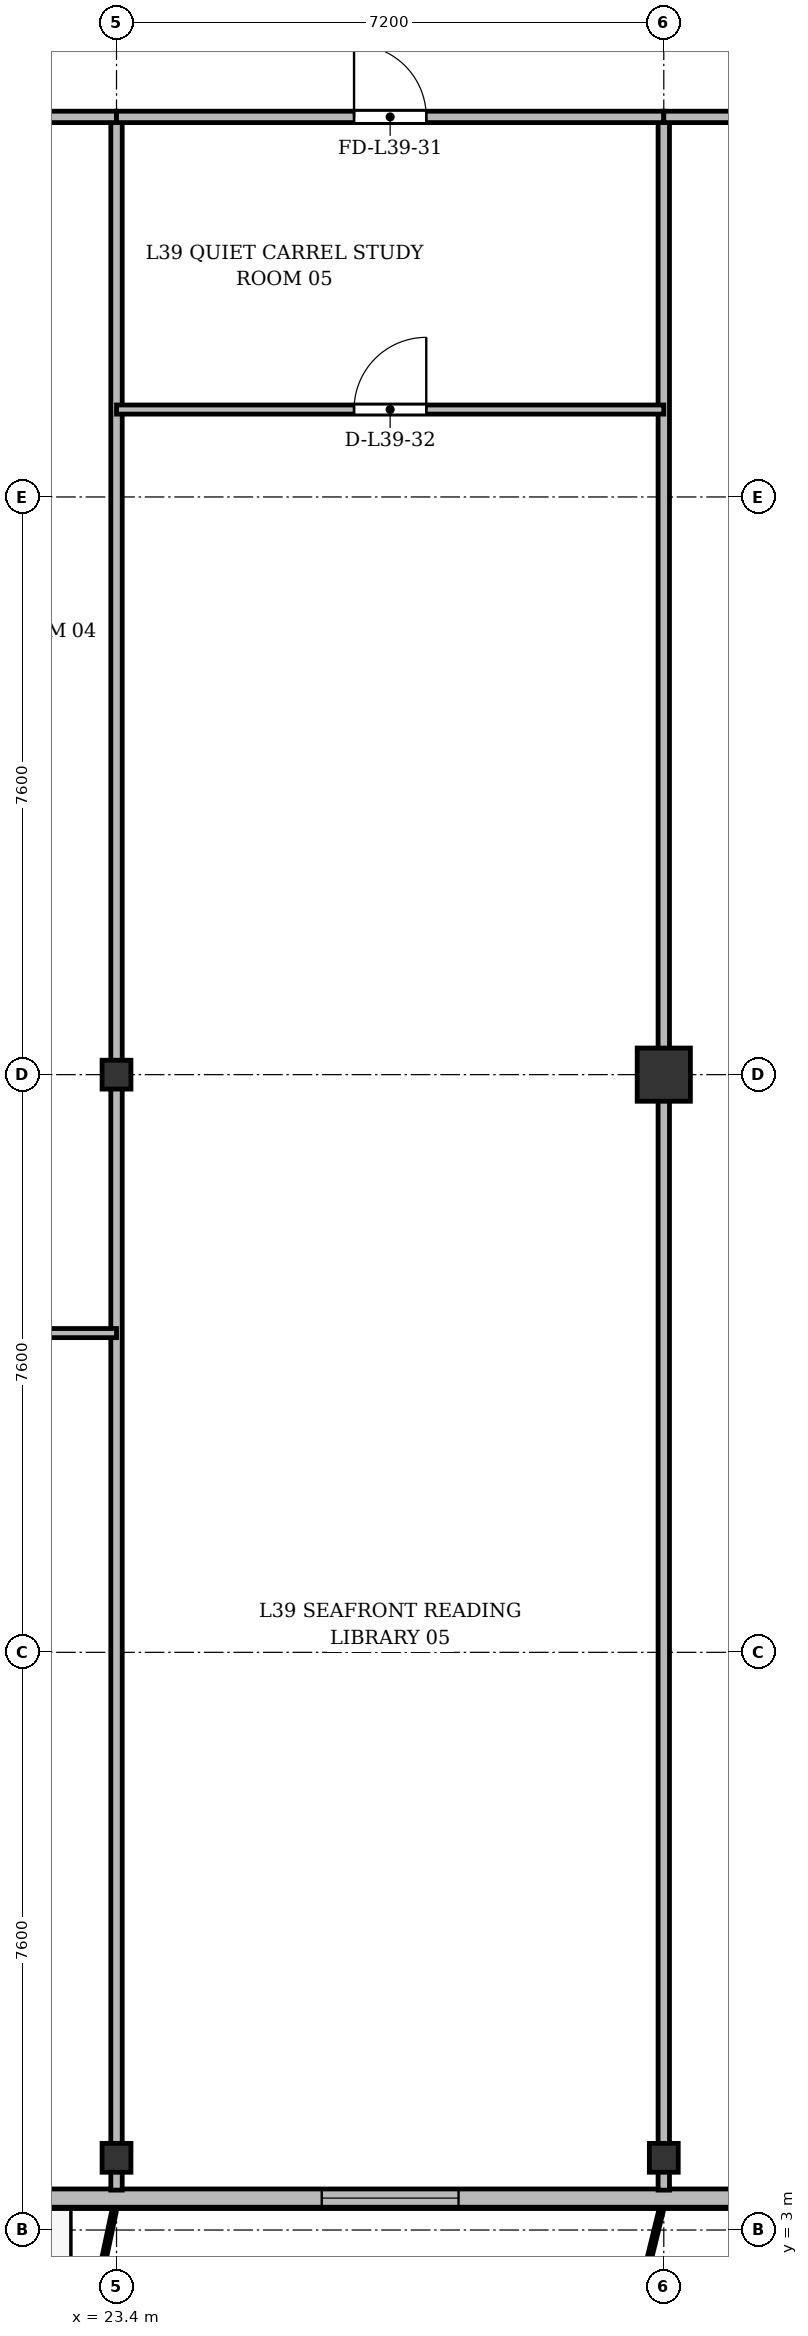
"""IFC4 building model, lengths in metres.
Left out: names, types, materials, properties, quantities, classifications, styles, units other than length and angle.
Written with IfcOpenShell. Run it as: python <this file> out.ifc"""

import sys

from ifc_helpers import new_model, si_unit, direction, frame, frame_2d, origin, origin_2d, place, context, subcontext, project, spatial, rectangle, i_section, extrude, source, transform, mapped, element, fill, save


model = new_model("IFC4")
c1 = context("Model", 3, precision=1e-05, world=origin(), true_north=direction((0.0, 1.0)))
c2 = subcontext(c1, "Body", "Model", "MODEL_VIEW")
j1 = project(units=[si_unit("LENGTHUNIT", "METRE"), si_unit("PLANEANGLEUNIT", "RADIAN")], contexts=[c1])
p1 = place(None, origin())
s1 = spatial("IfcSite", under=j1, at=p1, CompositionType="ELEMENT")
p2 = place(p1, origin())
s2 = spatial("IfcBuilding", under=s1, at=p2, CompositionType="ELEMENT")
p3 = place(p2, frame((0.0, 0.0, 150.1)))
s3 = spatial("IfcBuildingStorey", under=s2, at=p3, CompositionType="ELEMENT", Elevation=150.1)
m1 = source(origin(), c2, "Body", "SweptSolid", [
    extrude(i_section(OverallWidth=0.38, OverallDepth=0.38, WebThickness=0.02, FlangeThickness=0.03, at=origin_2d()), origin(), (0.0, 0.0, 1.0), 3.6),
])
for number, where, z_axis, x_axis in (
    (1, (23.4, 3.95, 0.0), (0.0, 0.0, 1.0), (1.0, 0.0, 0.0)),
    (2, (23.4, 18.2, 0.0), (0.0, 0.0, 1.0), (1.0, 0.0, 0.0)),
    (3, (30.6, 3.95, 0.0), (0.0, 0.0, 1.0), (1.0, 0.0, 0.0)),
):
    element("IfcColumn", number, at=place(p3, frame(where, z_axis=z_axis, x_axis=x_axis)), inside=s3, PredefinedType="COLUMN", context=c2, shape_type="MappedRepresentation", body=[
        mapped(m1, transform((0.0, 0.0, 0.0), x_axis=(1.0, 0.0, 0.0), y_axis=(0.0, 1.0, 0.0), z_axis=(0.0, 0.0, 1.0), scale=1.0)),
    ])
m2 = source(origin(), c2, "Body", "SweptSolid", [
    extrude(rectangle(XDim=0.7, YDim=0.7, at=origin_2d()), origin(), (0.0, 0.0, 1.0), 3.6),
])
p4 = place(p3, frame((30.6, 18.2, 0.0), z_axis=(0.0, 0.0, 1.0), x_axis=(1.0, 0.0, 0.0)))
e4 = element("IfcColumn", 4, at=p4, inside=s3, PredefinedType="COLUMN", context=c2, shape_type="MappedRepresentation", body=[
    mapped(m2, transform((0.0, 0.0, 0.0), x_axis=(1.0, 0.0, 0.0), y_axis=(0.0, 1.0, 0.0), z_axis=(0.0, 0.0, 1.0), scale=1.0)),
])
p5 = place(p3, frame((63.6, 3.42, 0.0), z_axis=(0.0, 0.0, 1.0), x_axis=(-1.0, 0.0, 0.0)))
e5 = element("IfcWall", 5, at=p5, inside=s3, PredefinedType="SOLIDWALL", context=c2, shape_type="SweptSolid", body=[
    extrude(rectangle(XDim=52.8, YDim=0.24, at=frame_2d((26.4, 0.0))), origin(), (0.0, 0.0, 1.0), 3.35),
])
p6 = place(p5, frame((1.62, 0.0, 0.9)))
e6 = element("IfcOpeningElement", 6, at=p6, cuts=e5, PredefinedType="OPENING", context=c2, shape_type="SweptSolid", body=[
    extrude(rectangle(XDim=1.65, YDim=1.85, at=frame_2d((0.825, 0.925))), frame((0.0, 0.13, 0.0), z_axis=(0.0, -1.0, 0.0), x_axis=(1.0, 0.0, 0.0)), (0.0, 0.0, 1.0), 0.26),
])
p7 = place(p5, frame((5.2, 0.0, 0.9)))
e7 = element("IfcOpeningElement", 7, at=p7, cuts=e5, PredefinedType="OPENING", context=c2, shape_type="SweptSolid", body=[
    extrude(rectangle(XDim=1.8, YDim=1.8, at=frame_2d((0.9, 0.9))), frame((0.0, 0.13, 0.0), z_axis=(0.0, -1.0, 0.0), x_axis=(1.0, 0.0, 0.0)), (0.0, 0.0, 1.0), 0.26),
])
p8 = place(p5, frame((7.65, 0.0, 0.9)))
e8 = element("IfcOpeningElement", 8, at=p8, cuts=e5, PredefinedType="OPENING", context=c2, shape_type="SweptSolid", body=[
    extrude(rectangle(XDim=1.5, YDim=1.75, at=frame_2d((0.75, 0.875))), frame((0.0, 0.13, 0.0), z_axis=(0.0, -1.0, 0.0), x_axis=(1.0, 0.0, 0.0)), (0.0, 0.0, 1.0), 0.26),
])
p9 = place(p5, frame((10.25, 0.0, 0.9)))
e9 = element("IfcOpeningElement", 9, at=p9, cuts=e5, PredefinedType="OPENING", context=c2, shape_type="SweptSolid", body=[
    extrude(rectangle(XDim=1.5, YDim=1.75, at=frame_2d((0.75, 0.875))), frame((0.0, 0.13, 0.0), z_axis=(0.0, -1.0, 0.0), x_axis=(1.0, 0.0, 0.0)), (0.0, 0.0, 1.0), 0.26),
])
p10 = place(p5, frame((14.417, 0.0, 0.0)))
e10 = element("IfcOpeningElement", 10, at=p10, cuts=e5, PredefinedType="OPENING", context=c2, shape_type="SweptSolid", body=[
    extrude(rectangle(XDim=1.2, YDim=2.2, at=frame_2d((0.6, 1.1))), frame((0.0, 0.13, 0.0), z_axis=(0.0, -1.0, 0.0), x_axis=(1.0, 0.0, 0.0)), (0.0, 0.0, 1.0), 0.26),
])
p11 = place(p5, frame((25.575, 0.0, 0.9)))
e11 = element("IfcOpeningElement", 11, at=p11, cuts=e5, PredefinedType="OPENING", context=c2, shape_type="SweptSolid", body=[
    extrude(rectangle(XDim=1.65, YDim=1.85, at=frame_2d((0.825, 0.925))), frame((0.0, 0.13, 0.0), z_axis=(0.0, -1.0, 0.0), x_axis=(1.0, 0.0, 0.0)), (0.0, 0.0, 1.0), 0.26),
])
p12 = place(p5, frame((35.7, 0.0, 0.9)))
e12 = element("IfcOpeningElement", 12, at=p12, cuts=e5, PredefinedType="OPENING", context=c2, shape_type="SweptSolid", body=[
    extrude(rectangle(XDim=1.8, YDim=1.8, at=frame_2d((0.9, 0.9))), frame((0.0, 0.13, 0.0), z_axis=(0.0, -1.0, 0.0), x_axis=(1.0, 0.0, 0.0)), (0.0, 0.0, 1.0), 0.26),
])
p13 = place(p5, frame((41.656, 0.0, 0.0)))
e13 = element("IfcOpeningElement", 13, at=p13, cuts=e5, PredefinedType="OPENING", context=c2, shape_type="SweptSolid", body=[
    extrude(rectangle(XDim=1.2, YDim=2.2, at=frame_2d((0.6, 1.1))), frame((0.0, 0.13, 0.0), z_axis=(0.0, -1.0, 0.0), x_axis=(1.0, 0.0, 0.0)), (0.0, 0.0, 1.0), 0.26),
])
p14 = place(p5, frame((43.65, 0.0, 0.9)))
e14 = element("IfcOpeningElement", 14, at=p14, cuts=e5, PredefinedType="OPENING", context=c2, shape_type="SweptSolid", body=[
    extrude(rectangle(XDim=1.5, YDim=1.75, at=frame_2d((0.75, 0.875))), frame((0.0, 0.13, 0.0), z_axis=(0.0, -1.0, 0.0), x_axis=(1.0, 0.0, 0.0)), (0.0, 0.0, 1.0), 0.26),
])
p15 = place(p5, frame((45.7, 0.0, 0.9)))
e15 = element("IfcOpeningElement", 15, at=p15, cuts=e5, PredefinedType="OPENING", context=c2, shape_type="SweptSolid", body=[
    extrude(rectangle(XDim=2.0, YDim=1.95, at=frame_2d((1.0, 0.975))), frame((0.0, 0.13, 0.0), z_axis=(0.0, -1.0, 0.0), x_axis=(1.0, 0.0, 0.0)), (0.0, 0.0, 1.0), 0.26),
])
p16 = place(p5, frame((49.53, 0.0, 0.9)))
e16 = element("IfcOpeningElement", 16, at=p16, cuts=e5, PredefinedType="OPENING", context=c2, shape_type="SweptSolid", body=[
    extrude(rectangle(XDim=1.65, YDim=1.85, at=frame_2d((0.825, 0.925))), frame((0.0, 0.13, 0.0), z_axis=(0.0, -1.0, 0.0), x_axis=(1.0, 0.0, 0.0)), (0.0, 0.0, 1.0), 0.26),
])
for number, where, z_axis, x_axis in (
    (17, (23.4, 3.525, 0.0), (0.0, 0.0, 1.0), (0.0, 1.0, 0.0)),
    (18, (30.6, 3.525, 0.0), (0.0, 0.0, 1.0), (0.0, 1.0, 0.0)),
):
    element("IfcWall", number, at=place(p3, frame(where, z_axis=z_axis, x_axis=x_axis)), inside=s3, PredefinedType="PARTITIONING", context=c2, shape_type="SweptSolid", body=[
        extrude(rectangle(XDim=27.275, YDim=0.15, at=frame_2d((13.638, 0.0))), origin(), (0.0, 0.0, 1.0), 2.85),
    ])
p17 = place(p3, frame((20.2, 30.8, 0.0), z_axis=(0.0, 0.0, 1.0), x_axis=(1.0, 0.0, 0.0)))
e19 = element("IfcWall", 19, at=p17, inside=s3, PredefinedType="PARTITIONING", context=c2, shape_type="SweptSolid", body=[
    extrude(rectangle(XDim=3.2, YDim=0.15, at=frame_2d((1.6, 0.0))), origin(), (0.0, 0.0, 1.0), 2.85),
])
p18 = place(p17, frame((1.125, 0.0, 0.0)))
e20 = element("IfcOpeningElement", 20, at=p18, cuts=e19, PredefinedType="OPENING", context=c2, shape_type="SweptSolid", body=[
    extrude(rectangle(XDim=0.95, YDim=2.15, at=frame_2d((0.475, 1.075))), frame((0.0, 0.085, 0.0), z_axis=(0.0, -1.0, 0.0), x_axis=(1.0, 0.0, 0.0)), (0.0, 0.0, 1.0), 0.17),
])
p19 = place(p3, frame((20.2, 14.8, 0.0), z_axis=(0.0, 0.0, 1.0), x_axis=(1.0, 0.0, 0.0)))
e21 = element("IfcWall", 21, at=p19, inside=s3, PredefinedType="PARTITIONING", context=c2, shape_type="SweptSolid", body=[
    extrude(rectangle(XDim=3.2, YDim=0.12, at=frame_2d((1.6, 0.0))), origin(), (0.0, 0.0, 1.0), 2.85),
])
p20 = place(p19, frame((1.125, 0.0, 0.0)))
e22 = element("IfcOpeningElement", 22, at=p20, cuts=e21, PredefinedType="OPENING", context=c2, shape_type="SweptSolid", body=[
    extrude(rectangle(XDim=0.95, YDim=2.15, at=frame_2d((0.475, 1.075))), frame((0.0, 0.07, 0.0), z_axis=(0.0, -1.0, 0.0), x_axis=(1.0, 0.0, 0.0)), (0.0, 0.0, 1.0), 0.14),
])
p21 = place(p3, frame((23.4, 30.8, 0.0), z_axis=(0.0, 0.0, 1.0), x_axis=(1.0, 0.0, 0.0)))
e23 = element("IfcWall", 23, at=p21, inside=s3, PredefinedType="PARTITIONING", context=c2, shape_type="SweptSolid", body=[
    extrude(rectangle(XDim=7.2, YDim=0.15, at=frame_2d((3.6, 0.0))), origin(), (0.0, 0.0, 1.0), 2.85),
])
p22 = place(p21, frame((3.125, 0.0, 0.0)))
e24 = element("IfcOpeningElement", 24, at=p22, cuts=e23, PredefinedType="OPENING", context=c2, shape_type="SweptSolid", body=[
    extrude(rectangle(XDim=0.95, YDim=2.15, at=frame_2d((0.475, 1.075))), frame((0.0, 0.085, 0.0), z_axis=(0.0, -1.0, 0.0), x_axis=(1.0, 0.0, 0.0)), (0.0, 0.0, 1.0), 0.17),
])
p23 = place(p3, frame((23.4, 26.95, 0.0), z_axis=(0.0, 0.0, 1.0), x_axis=(1.0, 0.0, 0.0)))
e25 = element("IfcWall", 25, at=p23, inside=s3, PredefinedType="PARTITIONING", context=c2, shape_type="SweptSolid", body=[
    extrude(rectangle(XDim=7.2, YDim=0.12, at=frame_2d((3.6, 0.0))), origin(), (0.0, 0.0, 1.0), 2.85),
])
p24 = place(p23, frame((3.125, 0.0, 0.0)))
e26 = element("IfcOpeningElement", 26, at=p24, cuts=e25, PredefinedType="OPENING", context=c2, shape_type="SweptSolid", body=[
    extrude(rectangle(XDim=0.95, YDim=2.15, at=frame_2d((0.475, 1.075))), frame((0.0, 0.07, 0.0), z_axis=(0.0, -1.0, 0.0), x_axis=(1.0, 0.0, 0.0)), (0.0, 0.0, 1.0), 0.14),
])
p25 = place(p3, frame((30.6, 30.8, 0.0), z_axis=(0.0, 0.0, 1.0), x_axis=(1.0, 0.0, 0.0)))
e27 = element("IfcWall", 27, at=p25, inside=s3, PredefinedType="PARTITIONING", context=c2, shape_type="SweptSolid", body=[
    extrude(rectangle(XDim=13.2, YDim=0.15, at=frame_2d((6.6, 0.0))), origin(), (0.0, 0.0, 1.0), 2.85),
])
p26 = place(p25, frame((5.8, 0.0, 0.0)))
e28 = element("IfcOpeningElement", 28, at=p26, cuts=e27, PredefinedType="OPENING", context=c2, shape_type="SweptSolid", body=[
    extrude(rectangle(XDim=1.6, YDim=2.2, at=frame_2d((0.8, 1.1))), frame((0.0, 0.085, 0.0), z_axis=(0.0, -1.0, 0.0), x_axis=(1.0, 0.0, 0.0)), (0.0, 0.0, 1.0), 0.17),
])
m3 = source(origin(), c2, "Body", "SweptSolid", [
    extrude(rectangle(XDim=1.8, YDim=1.8, at=frame_2d((0.9, 0.9))), frame((0.0, 0.03, 0.0), z_axis=(0.0, -1.0, 0.0), x_axis=(1.0, 0.0, 0.0)), (0.0, 0.0, 1.0), 0.06),
])
p27 = place(p12, origin())
e29 = element("IfcWindow", 29, at=p27, inside=s3, PartitioningType="SINGLE_PANEL", PredefinedType="WINDOW", context=c2, shape_type="MappedRepresentation", body=[
    mapped(m3, transform((0.0, 0.0, 0.0), x_axis=(1.0, 0.0, 0.0), y_axis=(0.0, 1.0, 0.0), z_axis=(0.0, 0.0, 1.0), scale=1.0)),
])
fill(e12, e29)
m4 = source(origin(), c2, "Body", "SweptSolid", [
    extrude(rectangle(XDim=0.95, YDim=2.15, at=frame_2d((0.475, 1.075))), frame((0.0, 0.025, 0.0), z_axis=(0.0, -1.0, 0.0), x_axis=(1.0, 0.0, 0.0)), (0.0, 0.0, 1.0), 0.05),
])
p28 = place(p22, origin())
e30 = element("IfcDoor", 30, at=p28, inside=s3, OperationType="SINGLE_SWING_LEFT", PredefinedType="DOOR", context=c2, shape_type="MappedRepresentation", body=[
    mapped(m4, transform((0.0, 0.0, 0.0), x_axis=(1.0, 0.0, 0.0), y_axis=(0.0, 1.0, 0.0), z_axis=(0.0, 0.0, 1.0), scale=1.0)),
])
fill(e24, e30)
p29 = place(p24, origin())
e31 = element("IfcDoor", 31, at=p29, inside=s3, OperationType="SINGLE_SWING_RIGHT", PredefinedType="DOOR", context=c2, shape_type="MappedRepresentation", body=[
    mapped(m4, transform((0.0, 0.0, 0.0), x_axis=(1.0, 0.0, 0.0), y_axis=(0.0, 1.0, 0.0), z_axis=(0.0, 0.0, 1.0), scale=1.0)),
])
fill(e26, e31)
save(model, sys.argv[1])
